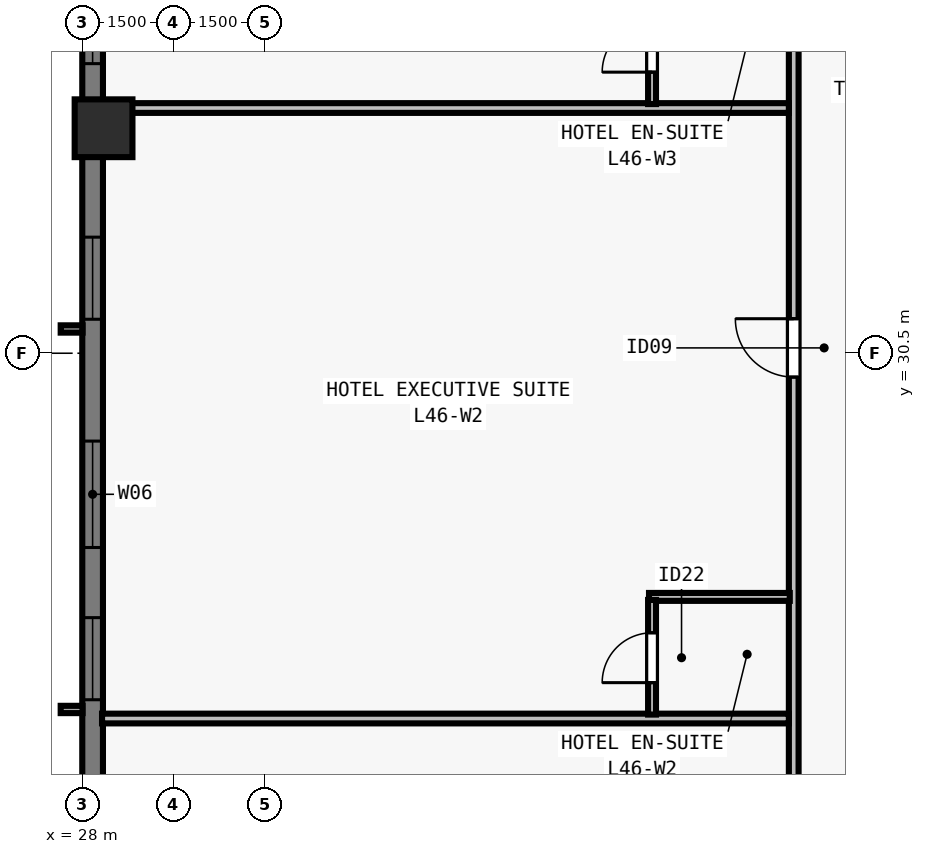
"""IFC4 building model, lengths in metres.
Left out: names, types, materials, properties, quantities, classifications, styles, units other than length and angle.
Written with IfcOpenShell. Run it as: python <this file> out.ifc"""

import sys

from ifc_helpers import new_model, si_unit, direction, frame, frame_2d, origin, origin_2d, place, context, subcontext, project, spatial, rectangle, extrude, element, fill, save


model = new_model("IFC4")
c1 = context("Model", 3, precision=1e-05, world=origin(), true_north=direction((0.0, 1.0)))
c2 = subcontext(c1, "Body", "Model", "MODEL_VIEW")
j1 = project(units=[si_unit("LENGTHUNIT", "METRE"), si_unit("PLANEANGLEUNIT", "RADIAN")], contexts=[c1])
p1 = place(None, origin())
s1 = spatial("IfcSite", under=j1, at=p1, CompositionType="ELEMENT")
p2 = place(p1, origin())
s2 = spatial("IfcBuilding", under=s1, at=p2, CompositionType="ELEMENT")
p3 = place(p2, frame((0.0, 0.0, 169.0)))
s3 = spatial("IfcBuildingStorey", under=s2, at=p3, CompositionType="ELEMENT", Elevation=169.0)
p4 = place(p3, frame((28.35, 34.2, 0.0), z_axis=(0.0, 0.0, 1.0), x_axis=(0.0, 1.0, 0.0)))
e1 = element("IfcColumn", 1, at=p4, inside=s3, PredefinedType="COLUMN", context=c2, shape_type="SweptSolid", body=[
    extrude(rectangle(XDim=0.95, YDim=0.95, at=origin_2d()), origin(), (0.0, 0.0, 1.0), 3.5),
])
p5 = place(p3, frame((28.17, 19.0, 0.0), z_axis=(0.0, 0.0, 1.0), x_axis=(0.0, 1.0, 0.0)))
e2 = element("IfcWall", 2, at=p5, inside=s3, PredefinedType="SOLIDWALL", context=c2, shape_type="SweptSolid", body=[
    extrude(rectangle(XDim=39.682, YDim=0.34, at=frame_2d((19.841, 0.0))), origin(), (0.0, 0.0, 1.0), 3.28),
])
p6 = place(p5, frame((5.802, 0.0, 0.8)))
e3 = element("IfcOpeningElement", 3, at=p6, cuts=e2, PredefinedType="OPENING", context=c2, shape_type="SweptSolid", body=[
    extrude(rectangle(XDim=1.35, YDim=1.66, at=frame_2d((0.675, 0.83))), frame((0.0, 0.18, 0.0), z_axis=(0.0, -1.0, 0.0), x_axis=(1.0, 0.0, 0.0)), (0.0, 0.0, 1.0), 0.36),
])
p7 = place(p5, frame((8.305, 0.0, 0.8)))
e4 = element("IfcOpeningElement", 4, at=p7, cuts=e2, PredefinedType="OPENING", context=c2, shape_type="SweptSolid", body=[
    extrude(rectangle(XDim=1.75, YDim=1.66, at=frame_2d((0.875, 0.83))), frame((0.0, 0.18, 0.0), z_axis=(0.0, -1.0, 0.0), x_axis=(1.0, 0.0, 0.0)), (0.0, 0.0, 1.0), 0.36),
])
p8 = place(p5, frame((12.059, 0.0, 0.8)))
e5 = element("IfcOpeningElement", 5, at=p8, cuts=e2, PredefinedType="OPENING", context=c2, shape_type="SweptSolid", body=[
    extrude(rectangle(XDim=1.35, YDim=1.66, at=frame_2d((0.675, 0.83))), frame((0.0, 0.18, 0.0), z_axis=(0.0, -1.0, 0.0), x_axis=(1.0, 0.0, 0.0)), (0.0, 0.0, 1.0), 0.36),
])
p9 = place(p5, frame((16.262, 0.0, 0.8)))
e6 = element("IfcOpeningElement", 6, at=p9, cuts=e2, PredefinedType="OPENING", context=c2, shape_type="SweptSolid", body=[
    extrude(rectangle(XDim=1.75, YDim=1.66, at=frame_2d((0.875, 0.83))), frame((0.0, 0.18, 0.0), z_axis=(0.0, -1.0, 0.0), x_axis=(1.0, 0.0, 0.0)), (0.0, 0.0, 1.0), 0.36),
])
p10 = place(p5, frame((19.166, 0.0, 0.8)))
e7 = element("IfcOpeningElement", 7, at=p10, cuts=e2, PredefinedType="OPENING", context=c2, shape_type="SweptSolid", body=[
    extrude(rectangle(XDim=1.35, YDim=1.66, at=frame_2d((0.675, 0.83))), frame((0.0, 0.18, 0.0), z_axis=(0.0, -1.0, 0.0), x_axis=(1.0, 0.0, 0.0)), (0.0, 0.0, 1.0), 0.36),
])
p11 = place(p5, frame((22.07, 0.0, 0.8)))
e8 = element("IfcOpeningElement", 8, at=p11, cuts=e2, PredefinedType="OPENING", context=c2, shape_type="SweptSolid", body=[
    extrude(rectangle(XDim=1.75, YDim=1.66, at=frame_2d((0.875, 0.83))), frame((0.0, 0.18, 0.0), z_axis=(0.0, -1.0, 0.0), x_axis=(1.0, 0.0, 0.0)), (0.0, 0.0, 1.0), 0.36),
])
p12 = place(p5, frame((26.273, 0.0, 0.8)))
e9 = element("IfcOpeningElement", 9, at=p12, cuts=e2, PredefinedType="OPENING", context=c2, shape_type="SweptSolid", body=[
    extrude(rectangle(XDim=1.35, YDim=1.66, at=frame_2d((0.675, 0.83))), frame((0.0, 0.18, 0.0), z_axis=(0.0, -1.0, 0.0), x_axis=(1.0, 0.0, 0.0)), (0.0, 0.0, 1.0), 0.36),
])
p13 = place(p5, frame((29.627, 0.0, 0.8)))
e10 = element("IfcOpeningElement", 10, at=p13, cuts=e2, PredefinedType="OPENING", context=c2, shape_type="SweptSolid", body=[
    extrude(rectangle(XDim=1.75, YDim=1.66, at=frame_2d((0.875, 0.83))), frame((0.0, 0.18, 0.0), z_axis=(0.0, -1.0, 0.0), x_axis=(1.0, 0.0, 0.0)), (0.0, 0.0, 1.0), 0.36),
])
p14 = place(p5, frame((32.53, 0.0, 0.8)))
e11 = element("IfcOpeningElement", 11, at=p14, cuts=e2, PredefinedType="OPENING", context=c2, shape_type="SweptSolid", body=[
    extrude(rectangle(XDim=1.35, YDim=1.66, at=frame_2d((0.675, 0.83))), frame((0.0, 0.18, 0.0), z_axis=(0.0, -1.0, 0.0), x_axis=(1.0, 0.0, 0.0)), (0.0, 0.0, 1.0), 0.36),
])
p15 = place(p3, frame((39.7, 15.325, 0.0), z_axis=(0.0, 0.0, 1.0), x_axis=(0.0, 1.0, 0.0)))
e12 = element("IfcWall", 12, at=p15, inside=s3, PredefinedType="PARTITIONING", context=c2, shape_type="SweptSolid", body=[
    extrude(rectangle(XDim=47.35, YDim=0.16, at=frame_2d((23.675, 0.0))), origin(), (0.0, 0.0, 1.0), 2.555),
])
p16 = place(p15, frame((5.451, 0.0, 0.0)))
e13 = element("IfcOpeningElement", 13, at=p16, cuts=e12, PredefinedType="OPENING", context=c2, shape_type="SweptSolid", body=[
    extrude(rectangle(XDim=0.96, YDim=2.15, at=frame_2d((0.48, 1.075))), frame((0.0, 0.09, 0.0), z_axis=(0.0, -1.0, 0.0), x_axis=(1.0, 0.0, 0.0)), (0.0, 0.0, 1.0), 0.18),
])
p17 = place(p15, frame((14.783, 0.0, 0.0)))
e14 = element("IfcOpeningElement", 14, at=p17, cuts=e12, PredefinedType="OPENING", context=c2, shape_type="SweptSolid", body=[
    extrude(rectangle(XDim=0.96, YDim=2.15, at=frame_2d((0.48, 1.075))), frame((0.0, 0.09, 0.0), z_axis=(0.0, -1.0, 0.0), x_axis=(1.0, 0.0, 0.0)), (0.0, 0.0, 1.0), 0.18),
])
p18 = place(p15, frame((24.215, 0.0, 0.0)))
e15 = element("IfcOpeningElement", 15, at=p18, cuts=e12, PredefinedType="OPENING", context=c2, shape_type="SweptSolid", body=[
    extrude(rectangle(XDim=0.96, YDim=2.15, at=frame_2d((0.48, 1.075))), frame((0.0, 0.09, 0.0), z_axis=(0.0, -1.0, 0.0), x_axis=(1.0, 0.0, 0.0)), (0.0, 0.0, 1.0), 0.18),
])
p19 = place(p15, frame((33.647, 0.0, 0.0)))
e16 = element("IfcOpeningElement", 16, at=p19, cuts=e12, PredefinedType="OPENING", context=c2, shape_type="SweptSolid", body=[
    extrude(rectangle(XDim=0.96, YDim=2.15, at=frame_2d((0.48, 1.075))), frame((0.0, 0.09, 0.0), z_axis=(0.0, -1.0, 0.0), x_axis=(1.0, 0.0, 0.0)), (0.0, 0.0, 1.0), 0.18),
])
p20 = place(p15, frame((43.258, 0.0, 0.0)))
e17 = element("IfcOpeningElement", 17, at=p20, cuts=e12, PredefinedType="OPENING", context=c2, shape_type="SweptSolid", body=[
    extrude(rectangle(XDim=0.96, YDim=2.15, at=frame_2d((0.48, 1.075))), frame((0.0, 0.09, 0.0), z_axis=(0.0, -1.0, 0.0), x_axis=(1.0, 0.0, 0.0)), (0.0, 0.0, 1.0), 0.18),
])
p21 = place(p3, frame((28.325, 24.493, 0.0), z_axis=(0.0, 0.0, 1.0), x_axis=(1.0, 0.0, 0.0)))
e18 = element("IfcWall", 18, at=p21, inside=s3, PredefinedType="PARTITIONING", context=c2, shape_type="SweptSolid", body=[
    extrude(rectangle(XDim=11.295, YDim=0.16, at=frame_2d((5.647, 0.0))), origin(), (0.0, 0.0, 1.0), 2.896),
])
p22 = place(p3, frame((37.32, 26.493, 0.0), z_axis=(0.0, 0.0, 1.0), x_axis=(1.0, 0.0, 0.0)))
e19 = element("IfcWall", 19, at=p22, inside=s3, PredefinedType="PLUMBINGWALL", context=c2, shape_type="SweptSolid", body=[
    extrude(rectangle(XDim=2.315, YDim=0.13, at=frame_2d((1.157, 0.0))), origin(), (0.0, 0.0, 1.0), 2.896),
])
p23 = place(p3, frame((37.37, 24.558, 0.0), z_axis=(0.0, 0.0, 1.0), x_axis=(0.0, 1.0, 0.0)))
e20 = element("IfcWall", 20, at=p23, inside=s3, PredefinedType="PLUMBINGWALL", context=c2, shape_type="SweptSolid", body=[
    extrude(rectangle(XDim=1.885, YDim=0.13, at=frame_2d((0.942, 0.0))), origin(), (0.0, 0.0, 1.0), 3.28),
])
p24 = place(p23, frame((0.525, 0.0, 0.0)))
e21 = element("IfcOpeningElement", 21, at=p24, cuts=e20, PredefinedType="OPENING", context=c2, shape_type="SweptSolid", body=[
    extrude(rectangle(XDim=0.82, YDim=2.1, at=frame_2d((0.41, 1.05))), frame((0.0, 0.075, 0.0), z_axis=(0.0, -1.0, 0.0), x_axis=(1.0, 0.0, 0.0)), (0.0, 0.0, 1.0), 0.15),
])
p25 = place(p3, frame((28.325, 34.533, 0.0), z_axis=(0.0, 0.0, 1.0), x_axis=(1.0, 0.0, 0.0)))
e22 = element("IfcWall", 22, at=p25, inside=s3, PredefinedType="PARTITIONING", context=c2, shape_type="SweptSolid", body=[
    extrude(rectangle(XDim=11.295, YDim=0.16, at=frame_2d((5.647, 0.0))), origin(), (0.0, 0.0, 1.0), 2.896),
])
p26 = place(p3, frame((37.37, 34.598, 0.0), z_axis=(0.0, 0.0, 1.0), x_axis=(0.0, 1.0, 0.0)))
e23 = element("IfcWall", 23, at=p26, inside=s3, PredefinedType="PLUMBINGWALL", context=c2, shape_type="SweptSolid", body=[
    extrude(rectangle(XDim=1.885, YDim=0.13, at=frame_2d((0.942, 0.0))), origin(), (0.0, 0.0, 1.0), 3.28),
])
p27 = place(p26, frame((0.525, 0.0, 0.0)))
e24 = element("IfcOpeningElement", 24, at=p27, cuts=e23, PredefinedType="OPENING", context=c2, shape_type="SweptSolid", body=[
    extrude(rectangle(XDim=0.82, YDim=2.1, at=frame_2d((0.41, 1.05))), frame((0.0, 0.075, 0.0), z_axis=(0.0, -1.0, 0.0), x_axis=(1.0, 0.0, 0.0)), (0.0, 0.0, 1.0), 0.15),
])
p28 = place(p6, origin())
e25 = element("IfcWindow", 25, at=p28, inside=s3, PartitioningType="SINGLE_PANEL", PredefinedType="WINDOW", context=c2, shape_type="SweptSolid", body=[
    extrude(rectangle(XDim=1.35, YDim=1.66, at=frame_2d((0.675, 0.83))), frame((0.0, -0.05, 0.0), z_axis=(0.0, -1.0, 0.0), x_axis=(1.0, 0.0, 0.0)), (0.0, 0.0, 1.0), 0.06),
])
fill(e3, e25)
p29 = place(p7, origin())
e26 = element("IfcWindow", 26, at=p29, inside=s3, PartitioningType="SINGLE_PANEL", PredefinedType="WINDOW", context=c2, shape_type="SweptSolid", body=[
    extrude(rectangle(XDim=1.75, YDim=1.66, at=frame_2d((0.875, 0.83))), frame((0.0, -0.05, 0.0), z_axis=(0.0, -1.0, 0.0), x_axis=(1.0, 0.0, 0.0)), (0.0, 0.0, 1.0), 0.06),
])
fill(e4, e26)
p30 = place(p8, origin())
e27 = element("IfcWindow", 27, at=p30, inside=s3, PartitioningType="SINGLE_PANEL", PredefinedType="WINDOW", context=c2, shape_type="SweptSolid", body=[
    extrude(rectangle(XDim=1.35, YDim=1.66, at=frame_2d((0.675, 0.83))), frame((0.0, -0.05, 0.0), z_axis=(0.0, -1.0, 0.0), x_axis=(1.0, 0.0, 0.0)), (0.0, 0.0, 1.0), 0.06),
])
fill(e5, e27)
p31 = place(p9, origin())
e28 = element("IfcWindow", 28, at=p31, inside=s3, PartitioningType="SINGLE_PANEL", PredefinedType="WINDOW", context=c2, shape_type="SweptSolid", body=[
    extrude(rectangle(XDim=1.75, YDim=1.66, at=frame_2d((0.875, 0.83))), frame((0.0, -0.05, 0.0), z_axis=(0.0, -1.0, 0.0), x_axis=(1.0, 0.0, 0.0)), (0.0, 0.0, 1.0), 0.06),
])
fill(e6, e28)
p32 = place(p24, origin())
e29 = element("IfcDoor", 29, at=p32, inside=s3, OperationType="SINGLE_SWING_LEFT", PredefinedType="DOOR", context=c2, shape_type="SweptSolid", body=[
    extrude(rectangle(XDim=0.82, YDim=2.1, at=frame_2d((0.41, 1.05))), frame((0.0, 0.025, 0.0), z_axis=(0.0, -1.0, 0.0), x_axis=(1.0, 0.0, 0.0)), (0.0, 0.0, 1.0), 0.05),
])
fill(e21, e29)
p33 = place(p17, origin())
e30 = element("IfcDoor", 30, at=p33, inside=s3, OperationType="SINGLE_SWING_RIGHT", PredefinedType="DOOR", context=c2, shape_type="SweptSolid", body=[
    extrude(rectangle(XDim=0.96, YDim=2.15, at=frame_2d((0.48, 1.075))), frame((0.0, 0.025, 0.0), z_axis=(0.0, -1.0, 0.0), x_axis=(1.0, 0.0, 0.0)), (0.0, 0.0, 1.0), 0.05),
])
fill(e14, e30)
p34 = place(p27, origin())
e31 = element("IfcDoor", 31, at=p34, inside=s3, OperationType="SINGLE_SWING_LEFT", PredefinedType="DOOR", context=c2, shape_type="SweptSolid", body=[
    extrude(rectangle(XDim=0.82, YDim=2.1, at=frame_2d((0.41, 1.05))), frame((0.0, 0.025, 0.0), z_axis=(0.0, -1.0, 0.0), x_axis=(1.0, 0.0, 0.0)), (0.0, 0.0, 1.0), 0.05),
])
fill(e24, e31)
save(model, sys.argv[1])
